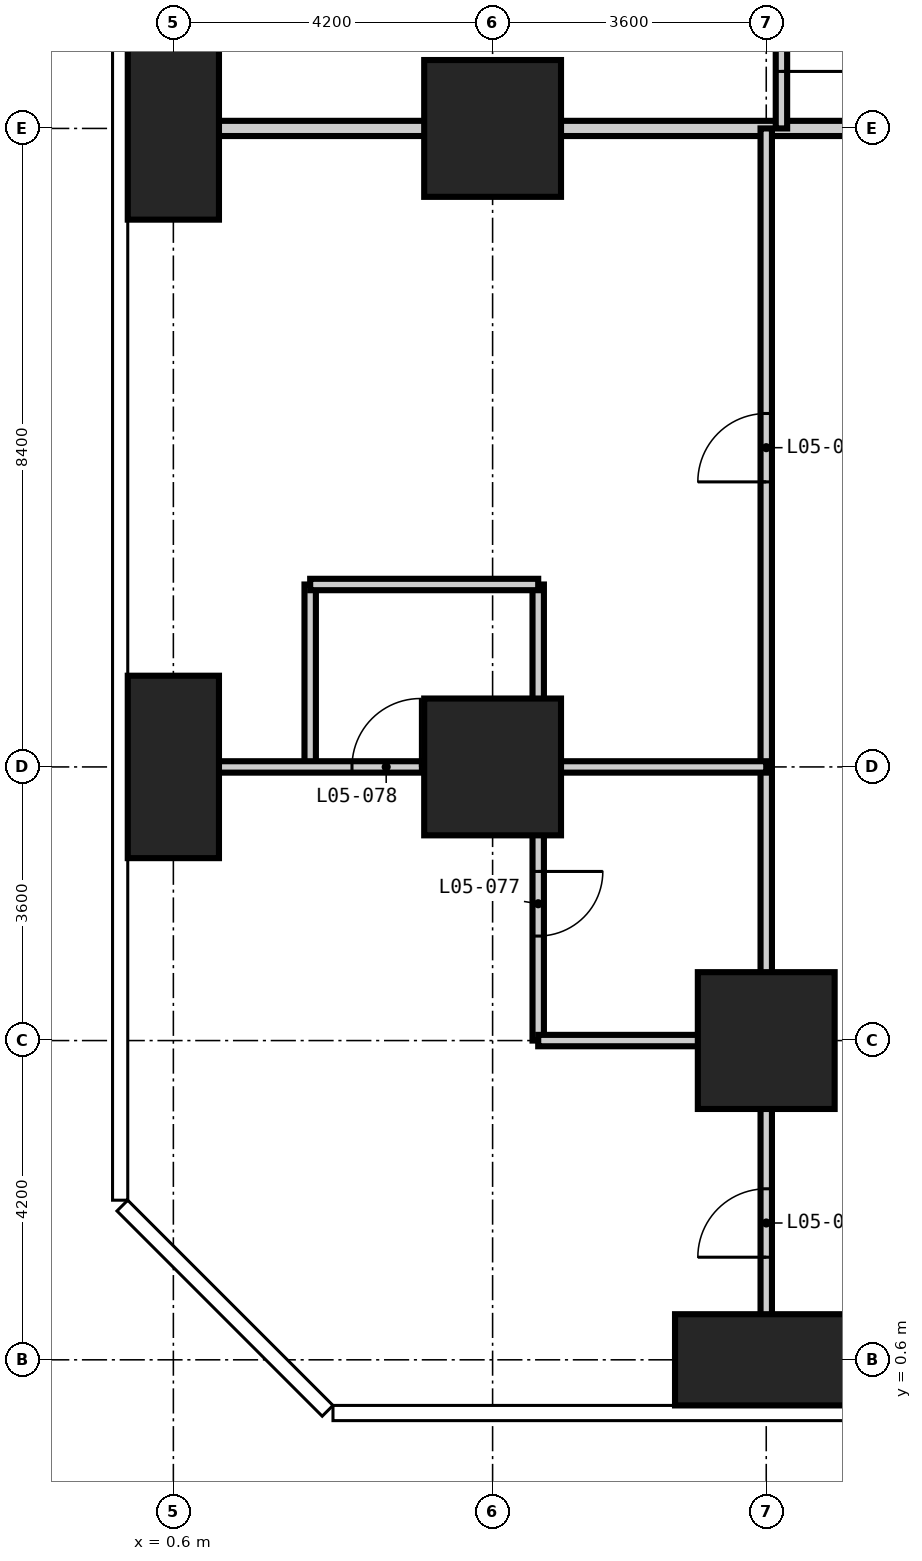
"""IFC4 building model, lengths in metres.
Left out: names, types, materials, properties, quantities, classifications, styles, units other than length and angle.
Written with IfcOpenShell. Run it as: python <this file> out.ifc"""

import sys

from ifc_helpers import new_model, si_unit, direction, frame, frame_2d, origin, origin_2d, place, context, subcontext, project, spatial, rectangle, extrude, element, fill, save


model = new_model("IFC4")
c1 = context("Model", 3, precision=1e-05, world=origin(), true_north=direction((0.0, 1.0)))
c2 = subcontext(c1, "Body", "Model", "MODEL_VIEW")
j1 = project(units=[si_unit("LENGTHUNIT", "METRE"), si_unit("PLANEANGLEUNIT", "RADIAN")], contexts=[c1])
p1 = place(None, origin())
s1 = spatial("IfcSite", under=j1, at=p1, CompositionType="ELEMENT")
p2 = place(p1, origin())
s2 = spatial("IfcBuilding", under=s1, at=p2, CompositionType="ELEMENT")
p3 = place(p2, frame((0.0, 0.0, 27.0)))
s3 = spatial("IfcBuildingStorey", under=s2, at=p3, CompositionType="ELEMENT", Elevation=27.0)
for number, where, z_axis, x_axis in (
    (1, (0.6, 8.4, -0.35), (0.0, 0.0, 1.0), (1.0, 0.0, 0.0)),
    (2, (0.6, 16.8, -0.35), (0.0, 0.0, 1.0), (1.0, 0.0, 0.0)),
):
    element("IfcColumn", number, at=place(p3, frame(where, z_axis=z_axis, x_axis=x_axis)), inside=s3, PredefinedType="COLUMN", context=c2, shape_type="SweptSolid", body=[
        extrude(rectangle(XDim=1.2, YDim=2.4, at=origin_2d()), origin(), (0.0, 0.0, 1.0), 3.6),
    ])
for number, where, z_axis, x_axis in (
    (3, (4.8, 8.4, -0.35), (0.0, 0.0, 1.0), (1.0, 0.0, 0.0)),
    (4, (4.8, 16.8, -0.35), (0.0, 0.0, 1.0), (1.0, 0.0, 0.0)),
):
    element("IfcColumn", number, at=place(p3, frame(where, z_axis=z_axis, x_axis=x_axis)), inside=s3, PredefinedType="COLUMN", context=c2, shape_type="SweptSolid", body=[
        extrude(rectangle(XDim=1.8, YDim=1.8, at=origin_2d()), origin(), (0.0, 0.0, 1.0), 3.6),
    ])
p4 = place(p3, frame((8.4, 0.6, -0.35), z_axis=(0.0, 0.0, 1.0), x_axis=(1.0, 0.0, 0.0)))
e5 = element("IfcColumn", 5, at=p4, inside=s3, PredefinedType="COLUMN", context=c2, shape_type="SweptSolid", body=[
    extrude(rectangle(XDim=2.4, YDim=1.2, at=origin_2d()), origin(), (0.0, 0.0, 1.0), 3.6),
])
p5 = place(p3, frame((8.4, 4.8, -0.35), z_axis=(0.0, 0.0, 1.0), x_axis=(1.0, 0.0, 0.0)))
e6 = element("IfcColumn", 6, at=p5, inside=s3, PredefinedType="COLUMN", context=c2, shape_type="SweptSolid", body=[
    extrude(rectangle(XDim=1.8, YDim=1.8, at=origin_2d()), origin(), (0.0, 0.0, 1.0), 3.6),
])
p6 = place(p3, frame((5.4, 4.8, 0.0), z_axis=(0.0, 0.0, 1.0), x_axis=(0.0, 1.0, 0.0)))
e7 = element("IfcWall", 7, at=p6, inside=s3, PredefinedType="PARTITIONING", context=c2, shape_type="SweptSolid", body=[
    extrude(rectangle(XDim=3.6, YDim=0.15, at=frame_2d((1.8, 0.0))), origin(), (0.0, 0.0, 1.0), 3.25),
])
p7 = place(p6, frame((1.375, 0.0, 0.0)))
e8 = element("IfcOpeningElement", 8, at=p7, cuts=e7, PredefinedType="OPENING", context=c2, shape_type="SweptSolid", body=[
    extrude(rectangle(XDim=0.85, YDim=2.1, at=frame_2d((0.425, 1.05))), frame((0.0, 0.085, 0.0), z_axis=(0.0, -1.0, 0.0), x_axis=(1.0, 0.0, 0.0)), (0.0, 0.0, 1.0), 0.17),
])
p8 = place(p3, frame((5.4, 4.8, 0.0), z_axis=(0.0, 0.0, 1.0), x_axis=(1.0, 0.0, 0.0)))
e9 = element("IfcWall", 9, at=p8, inside=s3, PredefinedType="PARTITIONING", context=c2, shape_type="SweptSolid", body=[
    extrude(rectangle(XDim=3.0, YDim=0.15, at=frame_2d((1.5, 0.0))), origin(), (0.0, 0.0, 1.0), 3.25),
])
p9 = place(p3, frame((-0.008, 16.8, 0.0), z_axis=(0.0, 0.0, 1.0), x_axis=(1.0, 0.0, 0.0)))
e10 = element("IfcWall", 10, at=p9, inside=s3, PredefinedType="PARTITIONING", context=c2, shape_type="SweptSolid", body=[
    extrude(rectangle(XDim=13.408, YDim=0.2, at=frame_2d((6.704, 0.0))), origin(), (0.0, 0.0, 1.0), 3.25),
])
for number, where, z_axis, x_axis in (
    (11, (2.4, 8.4, 0.0), (0.0, 0.0, 1.0), (0.0, 1.0, 0.0)),
    (12, (5.4, 8.4, 0.0), (0.0, 0.0, 1.0), (0.0, 1.0, 0.0)),
):
    element("IfcWall", number, at=place(p3, frame(where, z_axis=z_axis, x_axis=x_axis)), inside=s3, PredefinedType="PARTITIONING", context=c2, shape_type="SweptSolid", body=[
        extrude(rectangle(XDim=2.4, YDim=0.15, at=frame_2d((1.2, 0.0))), origin(), (0.0, 0.0, 1.0), 3.25),
    ])
p10 = place(p3, frame((8.4, -0.008, 0.0), z_axis=(0.0, 0.0, 1.0), x_axis=(0.0, 1.0, 0.0)))
e13 = element("IfcWall", 13, at=p10, inside=s3, PredefinedType="PARTITIONING", context=c2, shape_type="SweptSolid", body=[
    extrude(rectangle(XDim=16.808, YDim=0.15, at=frame_2d((8.404, 0.0))), origin(), (0.0, 0.0, 1.0), 3.25),
])
p11 = place(p10, frame((1.958, 0.0, 0.0)))
e14 = element("IfcOpeningElement", 14, at=p11, cuts=e13, PredefinedType="OPENING", context=c2, shape_type="SweptSolid", body=[
    extrude(rectangle(XDim=0.9, YDim=2.1, at=frame_2d((0.45, 1.05))), frame((0.0, 0.085, 0.0), z_axis=(0.0, -1.0, 0.0), x_axis=(1.0, 0.0, 0.0)), (0.0, 0.0, 1.0), 0.17),
])
p12 = place(p10, frame((12.158, 0.0, 0.0)))
e15 = element("IfcOpeningElement", 15, at=p12, cuts=e13, PredefinedType="OPENING", context=c2, shape_type="SweptSolid", body=[
    extrude(rectangle(XDim=0.9, YDim=2.1, at=frame_2d((0.45, 1.05))), frame((0.0, 0.085, 0.0), z_axis=(0.0, -1.0, 0.0), x_axis=(1.0, 0.0, 0.0)), (0.0, 0.0, 1.0), 0.17),
])
p13 = place(p3, frame((8.6, 16.8, 0.0), z_axis=(0.0, 0.0, 1.0), x_axis=(0.0, 1.0, 0.0)))
e16 = element("IfcWall", 16, at=p13, inside=s3, PredefinedType="PARTITIONING", context=c2, shape_type="SweptSolid", body=[
    extrude(rectangle(XDim=2.4, YDim=0.15, at=frame_2d((1.2, 0.0))), origin(), (0.0, 0.0, 1.0), 3.25),
])
p14 = place(p13, frame((0.75, 0.0, 0.0)))
e17 = element("IfcOpeningElement", 17, at=p14, cuts=e16, PredefinedType="OPENING", context=c2, shape_type="SweptSolid", body=[
    extrude(rectangle(XDim=0.9, YDim=2.1, at=frame_2d((0.45, 1.05))), frame((0.0, 0.085, 0.0), z_axis=(0.0, -1.0, 0.0), x_axis=(1.0, 0.0, 0.0)), (0.0, 0.0, 1.0), 0.17),
])
p15 = place(p3, frame((-0.008, 8.4, 0.0), z_axis=(0.0, 0.0, 1.0), x_axis=(1.0, 0.0, 0.0)))
e18 = element("IfcWall", 18, at=p15, inside=s3, PredefinedType="PARTITIONING", context=c2, shape_type="SweptSolid", body=[
    extrude(rectangle(XDim=8.408, YDim=0.15, at=frame_2d((4.204, 0.0))), origin(), (0.0, 0.0, 1.0), 3.25),
])
p16 = place(p15, frame((2.958, 0.0, 0.0)))
e19 = element("IfcOpeningElement", 19, at=p16, cuts=e18, PredefinedType="OPENING", context=c2, shape_type="SweptSolid", body=[
    extrude(rectangle(XDim=0.9, YDim=2.1, at=frame_2d((0.45, 1.05))), frame((0.0, 0.085, 0.0), z_axis=(0.0, -1.0, 0.0), x_axis=(1.0, 0.0, 0.0)), (0.0, 0.0, 1.0), 0.17),
])
p17 = place(p3, frame((2.4, 10.8, 0.0), z_axis=(0.0, 0.0, 1.0), x_axis=(1.0, 0.0, 0.0)))
e20 = element("IfcWall", 20, at=p17, inside=s3, PredefinedType="PARTITIONING", context=c2, shape_type="SweptSolid", body=[
    extrude(rectangle(XDim=3.0, YDim=0.15, at=frame_2d((1.5, 0.0))), origin(), (0.0, 0.0, 1.0), 3.25),
])
p18 = place(p14, frame((0.9, 0.0, 0.0), z_axis=(0.0, 0.0, 1.0), x_axis=(-1.0, 0.0, 0.0)))
e21 = element("IfcDoor", 21, at=p18, inside=s3, OperationType="SINGLE_SWING_RIGHT", PredefinedType="DOOR", context=c2, shape_type="SweptSolid", body=[
    extrude(rectangle(XDim=0.9, YDim=2.1, at=frame_2d((0.45, 1.05))), frame((0.0, 0.025, 0.0), z_axis=(0.0, -1.0, 0.0), x_axis=(1.0, 0.0, 0.0)), (0.0, 0.0, 1.0), 0.05),
])
fill(e17, e21)
p19 = place(p11, origin())
e22 = element("IfcDoor", 22, at=p19, inside=s3, OperationType="SINGLE_SWING_LEFT", PredefinedType="DOOR", context=c2, shape_type="SweptSolid", body=[
    extrude(rectangle(XDim=0.9, YDim=2.1, at=frame_2d((0.45, 1.05))), frame((0.0, 0.025, 0.0), z_axis=(0.0, -1.0, 0.0), x_axis=(1.0, 0.0, 0.0)), (0.0, 0.0, 1.0), 0.05),
])
fill(e14, e22)
p20 = place(p7, frame((0.85, 0.0, 0.0), z_axis=(0.0, 0.0, 1.0), x_axis=(-1.0, 0.0, 0.0)))
e23 = element("IfcDoor", 23, at=p20, inside=s3, OperationType="SINGLE_SWING_LEFT", PredefinedType="DOOR", context=c2, shape_type="SweptSolid", body=[
    extrude(rectangle(XDim=0.85, YDim=2.1, at=frame_2d((0.425, 1.05))), frame((0.0, 0.025, 0.0), z_axis=(0.0, -1.0, 0.0), x_axis=(1.0, 0.0, 0.0)), (0.0, 0.0, 1.0), 0.05),
])
fill(e8, e23)
p21 = place(p16, origin())
e24 = element("IfcDoor", 24, at=p21, inside=s3, OperationType="SINGLE_SWING_RIGHT", PredefinedType="DOOR", context=c2, shape_type="SweptSolid", body=[
    extrude(rectangle(XDim=0.9, YDim=2.1, at=frame_2d((0.45, 1.05))), frame((0.0, 0.025, 0.0), z_axis=(0.0, -1.0, 0.0), x_axis=(1.0, 0.0, 0.0)), (0.0, 0.0, 1.0), 0.05),
])
fill(e19, e24)
p22 = place(p12, origin())
e25 = element("IfcDoor", 25, at=p22, inside=s3, OperationType="SINGLE_SWING_LEFT", PredefinedType="DOOR", context=c2, shape_type="SweptSolid", body=[
    extrude(rectangle(XDim=0.9, YDim=2.1, at=frame_2d((0.45, 1.05))), frame((0.0, 0.025, 0.0), z_axis=(0.0, -1.0, 0.0), x_axis=(1.0, 0.0, 0.0)), (0.0, 0.0, 1.0), 0.05),
])
fill(e15, e25)
save(model, sys.argv[1])
